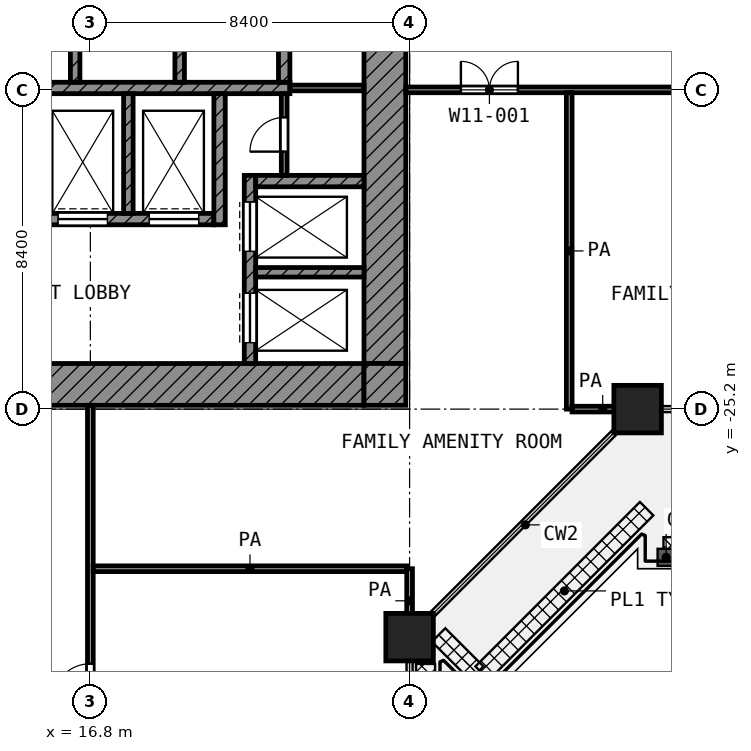
"""IFC4 building model, lengths in metres.
Left out: names, types, materials, properties, quantities, classifications, styles, units other than length and angle.
Written with IfcOpenShell. Run it as: python <this file> out.ifc"""

import sys

from ifc_helpers import new_model, si_unit, direction, frame, frame_2d, origin, origin_2d, place, context, subcontext, project, spatial, rectangle, extrude, element, fill, save


model = new_model("IFC4")
c1 = context("Model", 3, precision=1e-05, world=origin(), true_north=direction((0.0, 1.0)))
c2 = subcontext(c1, "Body", "Model", "MODEL_VIEW")
j1 = project(units=[si_unit("LENGTHUNIT", "METRE"), si_unit("PLANEANGLEUNIT", "RADIAN")], contexts=[c1])
p1 = place(None, origin())
s1 = spatial("IfcSite", under=j1, at=p1, CompositionType="ELEMENT")
p2 = place(p1, origin())
s2 = spatial("IfcBuilding", under=s1, at=p2, CompositionType="ELEMENT")
p3 = place(p2, frame((0.0, 0.0, 72.8)))
s3 = spatial("IfcBuildingStorey", under=s2, at=p3, CompositionType="ELEMENT", Elevation=72.8)
for number, where, z_axis, x_axis in (
    (1, (31.2, -25.2, 0.0), (0.0, 0.0, 1.0), (1.0, 0.0, 0.0)),
    (2, (25.2, -31.2, 0.0), (0.0, 0.0, 1.0), (1.0, 0.0, 0.0)),
):
    element("IfcColumn", number, at=place(p3, frame(where, z_axis=z_axis, x_axis=x_axis)), inside=s3, PredefinedType="COLUMN", context=c2, shape_type="SweptSolid", body=[
        extrude(rectangle(XDim=1.25, YDim=1.25, at=origin_2d()), origin(), (0.0, 0.0, 1.0), 4.2),
    ])
p4 = place(p3, frame((24.55, -24.0, 0.0), z_axis=(0.0, 0.0, 1.0), x_axis=(0.0, 1.0, 0.0)))
e3 = element("IfcWall", 3, at=p4, inside=s3, PredefinedType="SHEAR", context=c2, shape_type="SweptSolid", body=[
    extrude(rectangle(XDim=18.6, YDim=1.1, at=frame_2d((9.3, 0.0))), origin(), (0.0, 0.0, 1.0), 3.9),
])
p5 = place(p4, frame((10.5, 0.0, 0.0)))
e4 = element("IfcOpeningElement", 4, at=p5, cuts=e3, PredefinedType="OPENING", context=c2, shape_type="SweptSolid", body=[
    extrude(rectangle(XDim=1.8, YDim=2.1, at=frame_2d((0.9, 1.05))), frame((0.0, 0.56, 0.0), z_axis=(0.0, -1.0, 0.0), x_axis=(1.0, 0.0, 0.0)), (0.0, 0.0, 1.0), 1.12),
])
p6 = place(p3, frame((5.4, -24.55, 0.0), z_axis=(0.0, 0.0, 1.0), x_axis=(1.0, 0.0, 0.0)))
e5 = element("IfcWall", 5, at=p6, inside=s3, PredefinedType="SHEAR", context=c2, shape_type="SweptSolid", body=[
    extrude(rectangle(XDim=18.6, YDim=1.1, at=frame_2d((9.3, 0.0))), origin(), (0.0, 0.0, 1.0), 3.9),
])
p7 = place(p6, frame((6.3, 0.0, 0.0)))
e6 = element("IfcOpeningElement", 6, at=p7, cuts=e5, PredefinedType="OPENING", context=c2, shape_type="SweptSolid", body=[
    extrude(rectangle(XDim=1.8, YDim=2.1, at=frame_2d((0.9, 1.05))), frame((0.0, 0.56, 0.0), z_axis=(0.0, -1.0, 0.0), x_axis=(1.0, 0.0, 0.0)), (0.0, 0.0, 1.0), 1.12),
])
p8 = place(p3, frame((24.55, -25.1, 0.0), z_axis=(0.0, 0.0, 1.0), x_axis=(0.0, 1.0, 0.0)))
e7 = element("IfcWall", 7, at=p8, inside=s3, PredefinedType="SHEAR", context=c2, shape_type="SweptSolid", body=[
    extrude(rectangle(XDim=1.1, YDim=1.1, at=frame_2d((0.55, 0.0))), origin(), (0.0, 0.0, 1.0), 3.9),
])
p9 = place(p3, frame((5.4, -16.75, 0.0), z_axis=(0.0, 0.0, 1.0), x_axis=(1.0, 0.0, 0.0)))
e8 = element("IfcWall", 8, at=p9, inside=s3, PredefinedType="SHEAR", context=c2, shape_type="SweptSolid", body=[
    extrude(rectangle(XDim=16.65, YDim=0.3, at=frame_2d((8.325, 0.0))), origin(), (0.0, 0.0, 1.0), 3.9),
])
p10 = place(p3, frame((5.4, -20.2, 0.0), z_axis=(0.0, 0.0, 1.0), x_axis=(1.0, 0.0, 0.0)))
e9 = element("IfcWall", 9, at=p10, inside=s3, PredefinedType="SHEAR", context=c2, shape_type="SweptSolid", body=[
    extrude(rectangle(XDim=14.65, YDim=0.3, at=frame_2d((7.325, 0.0))), origin(), (0.0, 0.0, 1.0), 3.9),
])
p11 = place(p10, frame((10.55, 0.0, 0.0)))
e10 = element("IfcOpeningElement", 10, at=p11, cuts=e9, PredefinedType="OPENING", context=c2, shape_type="SweptSolid", body=[
    extrude(rectangle(XDim=1.3, YDim=2.1, at=frame_2d((0.65, 1.05))), frame((0.0, 0.16, 0.0), z_axis=(0.0, -1.0, 0.0), x_axis=(1.0, 0.0, 0.0)), (0.0, 0.0, 1.0), 0.32),
])
p12 = place(p10, frame((12.95, 0.0, 0.0)))
e11 = element("IfcOpeningElement", 11, at=p12, cuts=e9, PredefinedType="OPENING", context=c2, shape_type="SweptSolid", body=[
    extrude(rectangle(XDim=1.3, YDim=2.1, at=frame_2d((0.65, 1.05))), frame((0.0, 0.16, 0.0), z_axis=(0.0, -1.0, 0.0), x_axis=(1.0, 0.0, 0.0)), (0.0, 0.0, 1.0), 0.32),
])
p13 = place(p10, frame((0.55, 0.0, 0.0)))
e12 = element("IfcOpeningElement", 12, at=p13, cuts=e9, PredefinedType="OPENING", context=c2, shape_type="SweptSolid", body=[
    extrude(rectangle(XDim=1.3, YDim=2.1, at=frame_2d((0.65, 1.05))), frame((0.0, 0.16, 0.0), z_axis=(0.0, -1.0, 0.0), x_axis=(1.0, 0.0, 0.0)), (0.0, 0.0, 1.0), 0.32),
])
p14 = place(p10, frame((2.95, 0.0, 0.0)))
e13 = element("IfcOpeningElement", 13, at=p14, cuts=e9, PredefinedType="OPENING", context=c2, shape_type="SweptSolid", body=[
    extrude(rectangle(XDim=1.3, YDim=2.1, at=frame_2d((0.65, 1.05))), frame((0.0, 0.16, 0.0), z_axis=(0.0, -1.0, 0.0), x_axis=(1.0, 0.0, 0.0)), (0.0, 0.0, 1.0), 0.32),
])
p15 = place(p10, frame((6.55, 0.0, 0.0)))
e14 = element("IfcOpeningElement", 14, at=p15, cuts=e9, PredefinedType="OPENING", context=c2, shape_type="SweptSolid", body=[
    extrude(rectangle(XDim=0.9, YDim=2.1, at=frame_2d((0.45, 1.05))), frame((0.0, 0.16, 0.0), z_axis=(0.0, -1.0, 0.0), x_axis=(1.0, 0.0, 0.0)), (0.0, 0.0, 1.0), 0.32),
])
p16 = place(p10, frame((8.95, 0.0, 0.0)))
e15 = element("IfcOpeningElement", 15, at=p16, cuts=e9, PredefinedType="OPENING", context=c2, shape_type="SweptSolid", body=[
    extrude(rectangle(XDim=0.9, YDim=2.1, at=frame_2d((0.45, 1.05))), frame((0.0, 0.16, 0.0), z_axis=(0.0, -1.0, 0.0), x_axis=(1.0, 0.0, 0.0)), (0.0, 0.0, 1.0), 0.32),
])
p17 = place(p3, frame((20.2, -20.35, 0.0), z_axis=(0.0, 0.0, 1.0), x_axis=(0.0, 1.0, 0.0)))
e16 = element("IfcWall", 16, at=p17, inside=s3, PredefinedType="SHEAR", context=c2, shape_type="SweptSolid", body=[
    extrude(rectangle(XDim=3.45, YDim=0.3, at=frame_2d((1.725, 0.0))), origin(), (0.0, 0.0, 1.0), 3.9),
])
p18 = place(p3, frame((21.9, -16.6, 0.0), z_axis=(0.0, 0.0, 1.0), x_axis=(0.0, 1.0, 0.0)))
e17 = element("IfcWall", 17, at=p18, inside=s3, PredefinedType="SHEAR", context=c2, shape_type="SweptSolid", body=[
    extrude(rectangle(XDim=2.35, YDim=0.3, at=frame_2d((1.175, 0.0))), origin(), (0.0, 0.0, 1.0), 3.9),
])
p19 = place(p3, frame((21.15, -19.2, 0.0), z_axis=(0.0, 0.0, 1.0), x_axis=(1.0, 0.0, 0.0)))
e18 = element("IfcWall", 18, at=p19, inside=s3, PredefinedType="SHEAR", context=c2, shape_type="SweptSolid", body=[
    extrude(rectangle(XDim=2.85, YDim=0.3, at=frame_2d((1.425, 0.0))), origin(), (0.0, 0.0, 1.0), 3.9),
])
p20 = place(p3, frame((21.0, -24.0, 0.0), z_axis=(0.0, 0.0, 1.0), x_axis=(0.0, 1.0, 0.0)))
e19 = element("IfcWall", 19, at=p20, inside=s3, PredefinedType="SHEAR", context=c2, shape_type="SweptSolid", body=[
    extrude(rectangle(XDim=4.95, YDim=0.3, at=frame_2d((2.475, 0.0))), origin(), (0.0, 0.0, 1.0), 3.9),
])
p21 = place(p20, frame((2.95, 0.0, 0.0)))
e20 = element("IfcOpeningElement", 20, at=p21, cuts=e19, PredefinedType="OPENING", context=c2, shape_type="SweptSolid", body=[
    extrude(rectangle(XDim=1.3, YDim=2.1, at=frame_2d((0.65, 1.05))), frame((0.0, 0.16, 0.0), z_axis=(0.0, -1.0, 0.0), x_axis=(1.0, 0.0, 0.0)), (0.0, 0.0, 1.0), 0.32),
])
p22 = place(p20, frame((0.55, 0.0, 0.0)))
e21 = element("IfcOpeningElement", 21, at=p22, cuts=e19, PredefinedType="OPENING", context=c2, shape_type="SweptSolid", body=[
    extrude(rectangle(XDim=1.3, YDim=2.1, at=frame_2d((0.65, 1.05))), frame((0.0, 0.16, 0.0), z_axis=(0.0, -1.0, 0.0), x_axis=(1.0, 0.0, 0.0)), (0.0, 0.0, 1.0), 0.32),
])
p23 = place(p3, frame((21.15, -21.6, 0.0), z_axis=(0.0, 0.0, 1.0), x_axis=(1.0, 0.0, 0.0)))
e22 = element("IfcWall", 22, at=p23, inside=s3, PredefinedType="SHEAR", context=c2, shape_type="SweptSolid", body=[
    extrude(rectangle(XDim=2.85, YDim=0.25, at=frame_2d((1.425, 0.0))), origin(), (0.0, 0.0, 1.0), 3.9),
])
p24 = place(p3, frame((17.8, -20.05, 0.0), z_axis=(0.0, 0.0, 1.0), x_axis=(0.0, 1.0, 0.0)))
e23 = element("IfcWall", 23, at=p24, inside=s3, PredefinedType="SHEAR", context=c2, shape_type="SweptSolid", body=[
    extrude(rectangle(XDim=3.15, YDim=0.25, at=frame_2d((1.575, 0.0))), origin(), (0.0, 0.0, 1.0), 3.9),
])
for number, where, z_axis, x_axis in (
    (24, (16.4, -16.6, 0.0), (0.0, 0.0, 1.0), (0.0, 1.0, 0.0)),
    (25, (19.15, -16.6, 0.0), (0.0, 0.0, 1.0), (0.0, 1.0, 0.0)),
):
    element("IfcWall", number, at=place(p3, frame(where, z_axis=z_axis, x_axis=x_axis)), inside=s3, PredefinedType="SHEAR", context=c2, shape_type="SweptSolid", body=[
        extrude(rectangle(XDim=2.35, YDim=0.25, at=frame_2d((1.175, 0.0))), origin(), (0.0, 0.0, 1.0), 3.9),
    ])
p25 = place(p3, frame((21.9, -19.05, 0.0), z_axis=(0.0, 0.0, 1.0), x_axis=(0.0, 1.0, 0.0)))
e26 = element("IfcWall", 26, at=p25, inside=s3, PredefinedType="PARTITIONING", context=c2, shape_type="SweptSolid", body=[
    extrude(rectangle(XDim=2.15, YDim=0.15, at=frame_2d((1.075, 0.0))), origin(), (0.0, 0.0, 1.0), 3.9),
])
p26 = place(p25, frame((0.625, 0.0, 0.0)))
e27 = element("IfcOpeningElement", 27, at=p26, cuts=e26, PredefinedType="OPENING", context=c2, shape_type="SweptSolid", body=[
    extrude(rectangle(XDim=0.9, YDim=2.1, at=frame_2d((0.45, 1.05))), frame((0.0, 0.085, 0.0), z_axis=(0.0, -1.0, 0.0), x_axis=(1.0, 0.0, 0.0)), (0.0, 0.0, 1.0), 0.17),
])
p27 = place(p3, frame((22.05, -16.75, 0.0), z_axis=(0.0, 0.0, 1.0), x_axis=(1.0, 0.0, 0.0)))
e28 = element("IfcWall", 28, at=p27, inside=s3, PredefinedType="PARTITIONING", context=c2, shape_type="SweptSolid", body=[
    extrude(rectangle(XDim=1.95, YDim=0.15, at=frame_2d((0.975, 0.0))), origin(), (0.0, 0.0, 1.0), 3.9),
])
p28 = place(p3, frame((16.875, -29.4, 0.0), z_axis=(0.0, 0.0, 1.0), x_axis=(1.0, 0.0, 0.0)))
e29 = element("IfcWall", 29, at=p28, inside=s3, PredefinedType="PARTITIONING", context=c2, shape_type="SweptSolid", body=[
    extrude(rectangle(XDim=8.25, YDim=0.15, at=frame_2d((4.125, 0.0))), origin(), (0.0, 0.0, 1.0), 3.9),
])
p29 = place(p3, frame((29.475, -25.2, 0.0), z_axis=(0.0, 0.0, 1.0), x_axis=(1.0, 0.0, 0.0)))
e30 = element("IfcWall", 30, at=p29, inside=s3, PredefinedType="PARTITIONING", context=c2, shape_type="SweptSolid", body=[
    extrude(rectangle(XDim=1.612, YDim=0.15, at=frame_2d((0.806, 0.0))), origin(), (0.0, 0.0, 1.0), 3.9),
])
p30 = place(p3, frame((25.1, -16.8, 0.0), z_axis=(0.0, 0.0, 1.0), x_axis=(1.0, 0.0, 0.0)))
e31 = element("IfcWall", 31, at=p30, inside=s3, PredefinedType="PARTITIONING", context=c2, shape_type="SweptSolid", body=[
    extrude(rectangle(XDim=54.62, YDim=0.15, at=frame_2d((27.31, 0.0))), origin(), (0.0, 0.0, 1.0), 3.9),
])
p31 = place(p30, frame((1.45, 0.0, 0.0)))
e32 = element("IfcOpeningElement", 32, at=p31, cuts=e31, PredefinedType="OPENING", context=c2, shape_type="SweptSolid", body=[
    extrude(rectangle(XDim=1.5, YDim=2.1, at=frame_2d((0.75, 1.05))), frame((0.0, 0.085, 0.0), z_axis=(0.0, -1.0, 0.0), x_axis=(1.0, 0.0, 0.0)), (0.0, 0.0, 1.0), 0.17),
])
p32 = place(p30, frame((9.25, 0.0, 0.0)))
e33 = element("IfcOpeningElement", 33, at=p32, cuts=e31, PredefinedType="OPENING", context=c2, shape_type="SweptSolid", body=[
    extrude(rectangle(XDim=1.5, YDim=2.1, at=frame_2d((0.75, 1.05))), frame((0.0, 0.085, 0.0), z_axis=(0.0, -1.0, 0.0), x_axis=(1.0, 0.0, 0.0)), (0.0, 0.0, 1.0), 0.17),
])
p33 = place(p30, frame((15.0, 0.0, 0.0)))
e34 = element("IfcOpeningElement", 34, at=p33, cuts=e31, PredefinedType="OPENING", context=c2, shape_type="SweptSolid", body=[
    extrude(rectangle(XDim=1.2, YDim=2.1, at=frame_2d((0.6, 1.05))), frame((0.0, 0.085, 0.0), z_axis=(0.0, -1.0, 0.0), x_axis=(1.0, 0.0, 0.0)), (0.0, 0.0, 1.0), 0.17),
])
p34 = place(p30, frame((17.6, 0.0, 0.0)))
e35 = element("IfcOpeningElement", 35, at=p34, cuts=e31, PredefinedType="OPENING", context=c2, shape_type="SweptSolid", body=[
    extrude(rectangle(XDim=1.2, YDim=2.1, at=frame_2d((0.6, 1.05))), frame((0.0, 0.085, 0.0), z_axis=(0.0, -1.0, 0.0), x_axis=(1.0, 0.0, 0.0)), (0.0, 0.0, 1.0), 0.17),
])
p35 = place(p30, frame((26.2, 0.0, 0.0)))
e36 = element("IfcOpeningElement", 36, at=p35, cuts=e31, PredefinedType="OPENING", context=c2, shape_type="SweptSolid", body=[
    extrude(rectangle(XDim=1.2, YDim=2.1, at=frame_2d((0.6, 1.05))), frame((0.0, 0.085, 0.0), z_axis=(0.0, -1.0, 0.0), x_axis=(1.0, 0.0, 0.0)), (0.0, 0.0, 1.0), 0.17),
])
p36 = place(p30, frame((23.4, 0.0, 0.0)))
e37 = element("IfcOpeningElement", 37, at=p36, cuts=e31, PredefinedType="OPENING", context=c2, shape_type="SweptSolid", body=[
    extrude(rectangle(XDim=1.2, YDim=2.1, at=frame_2d((0.6, 1.05))), frame((0.0, 0.085, 0.0), z_axis=(0.0, -1.0, 0.0), x_axis=(1.0, 0.0, 0.0)), (0.0, 0.0, 1.0), 0.17),
])
p37 = place(p30, frame((28.45, 0.0, 0.0)))
e38 = element("IfcOpeningElement", 38, at=p37, cuts=e31, PredefinedType="OPENING", context=c2, shape_type="SweptSolid", body=[
    extrude(rectangle(XDim=1.2, YDim=2.1, at=frame_2d((0.6, 1.05))), frame((0.0, 0.085, 0.0), z_axis=(0.0, -1.0, 0.0), x_axis=(1.0, 0.0, 0.0)), (0.0, 0.0, 1.0), 0.17),
])
p38 = place(p30, frame((31.8, 0.0, 0.0)))
e39 = element("IfcOpeningElement", 39, at=p38, cuts=e31, PredefinedType="OPENING", context=c2, shape_type="SweptSolid", body=[
    extrude(rectangle(XDim=1.2, YDim=2.1, at=frame_2d((0.6, 1.05))), frame((0.0, 0.085, 0.0), z_axis=(0.0, -1.0, 0.0), x_axis=(1.0, 0.0, 0.0)), (0.0, 0.0, 1.0), 0.17),
])
p39 = place(p30, frame((30.35, 0.0, 0.0)))
e40 = element("IfcOpeningElement", 40, at=p39, cuts=e31, PredefinedType="OPENING", context=c2, shape_type="SweptSolid", body=[
    extrude(rectangle(XDim=1.1, YDim=2.1, at=frame_2d((0.55, 1.05))), frame((0.0, 0.085, 0.0), z_axis=(0.0, -1.0, 0.0), x_axis=(1.0, 0.0, 0.0)), (0.0, 0.0, 1.0), 0.17),
])
p40 = place(p30, frame((40.2, 0.0, 0.0)))
e41 = element("IfcOpeningElement", 41, at=p40, cuts=e31, PredefinedType="OPENING", context=c2, shape_type="SweptSolid", body=[
    extrude(rectangle(XDim=1.2, YDim=2.1, at=frame_2d((0.6, 1.05))), frame((0.0, 0.085, 0.0), z_axis=(0.0, -1.0, 0.0), x_axis=(1.0, 0.0, 0.0)), (0.0, 0.0, 1.0), 0.17),
])
p41 = place(p30, frame((43.1, 0.0, 0.0)))
e42 = element("IfcOpeningElement", 42, at=p41, cuts=e31, PredefinedType="OPENING", context=c2, shape_type="SweptSolid", body=[
    extrude(rectangle(XDim=1.2, YDim=2.1, at=frame_2d((0.6, 1.05))), frame((0.0, 0.085, 0.0), z_axis=(0.0, -1.0, 0.0), x_axis=(1.0, 0.0, 0.0)), (0.0, 0.0, 1.0), 0.17),
])
p42 = place(p30, frame((51.2, 0.0, 0.0)))
e43 = element("IfcOpeningElement", 43, at=p42, cuts=e31, PredefinedType="OPENING", context=c2, shape_type="SweptSolid", body=[
    extrude(rectangle(XDim=1.5, YDim=2.1, at=frame_2d((0.75, 1.05))), frame((0.0, 0.085, 0.0), z_axis=(0.0, -1.0, 0.0), x_axis=(1.0, 0.0, 0.0)), (0.0, 0.0, 1.0), 0.17),
])
p43 = place(p3, frame((16.8, -71.32, 0.0), z_axis=(0.0, 0.0, 1.0), x_axis=(0.0, 1.0, 0.0)))
e44 = element("IfcWall", 44, at=p43, inside=s3, PredefinedType="PARTITIONING", context=c2, shape_type="SweptSolid", body=[
    extrude(rectangle(XDim=46.22, YDim=0.15, at=frame_2d((23.11, 0.0))), origin(), (0.0, 0.0, 1.0), 3.9),
])
p44 = place(p43, frame((38.42, 0.0, 0.0)))
e45 = element("IfcOpeningElement", 45, at=p44, cuts=e44, PredefinedType="OPENING", context=c2, shape_type="SweptSolid", body=[
    extrude(rectangle(XDim=1.0, YDim=2.1, at=frame_2d((0.5, 1.05))), frame((0.0, 0.085, 0.0), z_axis=(0.0, -1.0, 0.0), x_axis=(1.0, 0.0, 0.0)), (0.0, 0.0, 1.0), 0.17),
])
p45 = place(p43, frame((30.22, 0.0, 0.0)))
e46 = element("IfcOpeningElement", 46, at=p45, cuts=e44, PredefinedType="OPENING", context=c2, shape_type="SweptSolid", body=[
    extrude(rectangle(XDim=1.2, YDim=2.1, at=frame_2d((0.6, 1.05))), frame((0.0, 0.085, 0.0), z_axis=(0.0, -1.0, 0.0), x_axis=(1.0, 0.0, 0.0)), (0.0, 0.0, 1.0), 0.17),
])
p46 = place(p43, frame((27.42, 0.0, 0.0)))
e47 = element("IfcOpeningElement", 47, at=p46, cuts=e44, PredefinedType="OPENING", context=c2, shape_type="SweptSolid", body=[
    extrude(rectangle(XDim=1.2, YDim=2.1, at=frame_2d((0.6, 1.05))), frame((0.0, 0.085, 0.0), z_axis=(0.0, -1.0, 0.0), x_axis=(1.0, 0.0, 0.0)), (0.0, 0.0, 1.0), 0.17),
])
p47 = place(p43, frame((25.57, 0.0, 0.0)))
e48 = element("IfcOpeningElement", 48, at=p47, cuts=e44, PredefinedType="OPENING", context=c2, shape_type="SweptSolid", body=[
    extrude(rectangle(XDim=1.2, YDim=2.1, at=frame_2d((0.6, 1.05))), frame((0.0, 0.085, 0.0), z_axis=(0.0, -1.0, 0.0), x_axis=(1.0, 0.0, 0.0)), (0.0, 0.0, 1.0), 0.17),
])
p48 = place(p43, frame((21.62, 0.0, 0.0)))
e49 = element("IfcOpeningElement", 49, at=p48, cuts=e44, PredefinedType="OPENING", context=c2, shape_type="SweptSolid", body=[
    extrude(rectangle(XDim=1.2, YDim=2.1, at=frame_2d((0.6, 1.05))), frame((0.0, 0.085, 0.0), z_axis=(0.0, -1.0, 0.0), x_axis=(1.0, 0.0, 0.0)), (0.0, 0.0, 1.0), 0.17),
])
p49 = place(p43, frame((14.32, 0.0, 0.0)))
e50 = element("IfcOpeningElement", 50, at=p49, cuts=e44, PredefinedType="OPENING", context=c2, shape_type="SweptSolid", body=[
    extrude(rectangle(XDim=1.2, YDim=2.1, at=frame_2d((0.6, 1.05))), frame((0.0, 0.085, 0.0), z_axis=(0.0, -1.0, 0.0), x_axis=(1.0, 0.0, 0.0)), (0.0, 0.0, 1.0), 0.17),
])
p50 = place(p43, frame((18.52, 0.0, 0.0)))
e51 = element("IfcOpeningElement", 51, at=p50, cuts=e44, PredefinedType="OPENING", context=c2, shape_type="SweptSolid", body=[
    extrude(rectangle(XDim=1.2, YDim=2.1, at=frame_2d((0.6, 1.05))), frame((0.0, 0.085, 0.0), z_axis=(0.0, -1.0, 0.0), x_axis=(1.0, 0.0, 0.0)), (0.0, 0.0, 1.0), 0.17),
])
p51 = place(p43, frame((10.92, 0.0, 0.0)))
e52 = element("IfcOpeningElement", 52, at=p51, cuts=e44, PredefinedType="OPENING", context=c2, shape_type="SweptSolid", body=[
    extrude(rectangle(XDim=0.9, YDim=2.1, at=frame_2d((0.45, 1.05))), frame((0.0, 0.085, 0.0), z_axis=(0.0, -1.0, 0.0), x_axis=(1.0, 0.0, 0.0)), (0.0, 0.0, 1.0), 0.17),
])
p52 = place(p43, frame((4.82, 0.0, 0.0)))
e53 = element("IfcOpeningElement", 53, at=p52, cuts=e44, PredefinedType="OPENING", context=c2, shape_type="SweptSolid", body=[
    extrude(rectangle(XDim=1.5, YDim=2.1, at=frame_2d((0.75, 1.05))), frame((0.0, 0.085, 0.0), z_axis=(0.0, -1.0, 0.0), x_axis=(1.0, 0.0, 0.0)), (0.0, 0.0, 1.0), 0.17),
])
p53 = place(p3, frame((25.2, -31.087, 0.0), z_axis=(0.0, 0.0, 1.0), x_axis=(0.0, 1.0, 0.0)))
e54 = element("IfcWall", 54, at=p53, inside=s3, PredefinedType="PARTITIONING", context=c2, shape_type="SweptSolid", body=[
    extrude(rectangle(XDim=1.687, YDim=0.15, at=frame_2d((0.844, 0.0))), origin(), (0.0, 0.0, 1.0), 3.9),
])
p54 = place(p3, frame((29.4, -25.2, 0.0), z_axis=(0.0, 0.0, 1.0), x_axis=(0.0, 1.0, 0.0)))
e55 = element("IfcWall", 55, at=p54, inside=s3, PredefinedType="PARTITIONING", context=c2, shape_type="SweptSolid", body=[
    extrude(rectangle(XDim=8.325, YDim=0.15, at=frame_2d((4.163, 0.0))), origin(), (0.0, 0.0, 1.0), 3.9),
])
p55 = place(p21, origin())
e56 = element("IfcDoor", 56, at=p55, inside=s3, OperationType="DOUBLE_DOOR_SLIDING", PredefinedType="DOOR", context=c2, shape_type="SweptSolid", body=[
    extrude(rectangle(XDim=1.3, YDim=2.1, at=frame_2d((0.65, 1.05))), frame((0.0, 0.025, 0.0), z_axis=(0.0, -1.0, 0.0), x_axis=(1.0, 0.0, 0.0)), (0.0, 0.0, 1.0), 0.05),
])
fill(e20, e56)
p56 = place(p22, origin())
e57 = element("IfcDoor", 57, at=p56, inside=s3, OperationType="DOUBLE_DOOR_SLIDING", PredefinedType="DOOR", context=c2, shape_type="SweptSolid", body=[
    extrude(rectangle(XDim=1.3, YDim=2.1, at=frame_2d((0.65, 1.05))), frame((0.0, 0.025, 0.0), z_axis=(0.0, -1.0, 0.0), x_axis=(1.0, 0.0, 0.0)), (0.0, 0.0, 1.0), 0.05),
])
fill(e21, e57)
p57 = place(p11, origin())
e58 = element("IfcDoor", 58, at=p57, inside=s3, OperationType="DOUBLE_DOOR_SLIDING", PredefinedType="DOOR", context=c2, shape_type="SweptSolid", body=[
    extrude(rectangle(XDim=1.3, YDim=2.1, at=frame_2d((0.65, 1.05))), frame((0.0, 0.025, 0.0), z_axis=(0.0, -1.0, 0.0), x_axis=(1.0, 0.0, 0.0)), (0.0, 0.0, 1.0), 0.05),
])
fill(e10, e58)
p58 = place(p12, origin())
e59 = element("IfcDoor", 59, at=p58, inside=s3, OperationType="DOUBLE_DOOR_SLIDING", PredefinedType="DOOR", context=c2, shape_type="SweptSolid", body=[
    extrude(rectangle(XDim=1.3, YDim=2.1, at=frame_2d((0.65, 1.05))), frame((0.0, 0.025, 0.0), z_axis=(0.0, -1.0, 0.0), x_axis=(1.0, 0.0, 0.0)), (0.0, 0.0, 1.0), 0.05),
])
fill(e11, e59)
p59 = place(p26, origin())
e60 = element("IfcDoor", 60, at=p59, inside=s3, OperationType="SINGLE_SWING_LEFT", PredefinedType="DOOR", context=c2, shape_type="SweptSolid", body=[
    extrude(rectangle(XDim=0.9, YDim=2.1, at=frame_2d((0.45, 1.05))), frame((0.0, 0.025, 0.0), z_axis=(0.0, -1.0, 0.0), x_axis=(1.0, 0.0, 0.0)), (0.0, 0.0, 1.0), 0.05),
])
fill(e27, e60)
p60 = place(p31, origin())
e61 = element("IfcDoor", 61, at=p60, inside=s3, OperationType="DOUBLE_DOOR_SINGLE_SWING", PredefinedType="DOOR", context=c2, shape_type="SweptSolid", body=[
    extrude(rectangle(XDim=1.5, YDim=2.1, at=frame_2d((0.75, 1.05))), frame((0.0, 0.025, 0.0), z_axis=(0.0, -1.0, 0.0), x_axis=(1.0, 0.0, 0.0)), (0.0, 0.0, 1.0), 0.05),
])
fill(e32, e61)
p61 = place(p44, origin())
e62 = element("IfcDoor", 62, at=p61, inside=s3, OperationType="SINGLE_SWING_LEFT", PredefinedType="DOOR", context=c2, shape_type="SweptSolid", body=[
    extrude(rectangle(XDim=1.0, YDim=2.1, at=frame_2d((0.5, 1.05))), frame((0.0, 0.025, 0.0), z_axis=(0.0, -1.0, 0.0), x_axis=(1.0, 0.0, 0.0)), (0.0, 0.0, 1.0), 0.05),
])
fill(e45, e62)
save(model, sys.argv[1])
